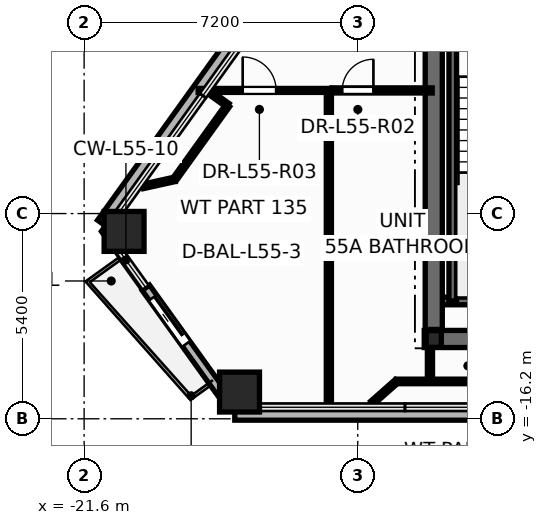
"""IFC4 building model, lengths in metres.
Left out: names, types, materials, properties, quantities, classifications, styles, units other than length and angle.
Written with IfcOpenShell. Run it as: python <this file> out.ifc"""

import sys

from ifc_helpers import new_model, si_unit, direction, frame, frame_2d, origin, origin_2d, place, context, subcontext, project, spatial, rectangle, hollow_rectangle, i_section, extrude, element, fill, save


model = new_model("IFC4")
c1 = context("Model", 3, precision=1e-05, world=origin(), true_north=direction((0.0, 1.0)))
c2 = subcontext(c1, "Body", "Model", "MODEL_VIEW")
j1 = project(units=[si_unit("LENGTHUNIT", "METRE"), si_unit("PLANEANGLEUNIT", "RADIAN")], contexts=[c1])
p1 = place(None, origin())
s1 = spatial("IfcSite", under=j1, at=p1, CompositionType="ELEMENT")
p2 = place(p1, origin())
s2 = spatial("IfcBuilding", under=s1, at=p2, CompositionType="ELEMENT")
p3 = place(p2, frame((0.0, 0.0, 210.9)))
s3 = spatial("IfcBuildingStorey", under=s2, at=p3, CompositionType="ELEMENT", Elevation=210.9)
for number, where, z_axis, x_axis in (
    (1, (-20.548, -11.27, 0.0), (0.0, 0.0, 1.0), (1.0, 0.0, 0.0)),
    (2, (-17.511, -15.497, 0.0), (0.0, 0.0, 1.0), (1.0, 0.0, 0.0)),
):
    element("IfcColumn", number, at=place(p3, frame(where, z_axis=z_axis, x_axis=x_axis)), inside=s3, PredefinedType="COLUMN", context=c2, shape_type="SweptSolid", body=[
        extrude(hollow_rectangle(XDim=1.05, YDim=1.05, WallThickness=0.045, at=origin_2d()), origin(), (0.0, 0.0, 1.0), 3.6),
    ])
p4 = place(p3, frame((-12.4, -14.1, 0.0), z_axis=(0.0, 0.0, 1.0), x_axis=(1.0, 0.0, 0.0)))
e3 = element("IfcColumn", 3, at=p4, inside=s3, PredefinedType="COLUMN", context=c2, shape_type="SweptSolid", body=[
    extrude(i_section(OverallWidth=0.4, OverallDepth=0.44, WebThickness=0.028, FlangeThickness=0.04, at=origin_2d()), origin(), (0.0, 0.0, 1.0), 3.6),
])
p5 = place(p3, frame((-17.636, -16.057, -0.2), z_axis=(0.0, 0.0, 1.0), x_axis=(1.0, 0.0, 0.0)))
e4 = element("IfcWall", 4, at=p5, inside=s3, PredefinedType="PARAPET", context=c2, shape_type="SweptSolid", body=[
    extrude(rectangle(XDim=35.272, YDim=0.36, at=frame_2d((17.636, 0.0))), origin(), (0.0, 0.0, 1.0), 0.38),
])
p6 = place(p3, frame((-12.032, 1.541, -0.2), z_axis=(0.0, 0.0, 1.0), x_axis=(-0.583546701141, -0.812079582053, 0.0)))
e5 = element("IfcWall", 5, at=p6, inside=s3, PredefinedType="PARAPET", context=c2, shape_type="SweptSolid", body=[
    extrude(rectangle(XDim=15.541, YDim=0.36, at=frame_2d((7.77, 0.0))), origin(), (0.0, 0.0, 1.0), 0.38),
])
p7 = place(p3, frame((-19.976, -12.751, -0.015), z_axis=(0.0, 0.0, 1.0), x_axis=(0.5835494265, -0.812077623649, 0.0)))
e6 = element("IfcWall", 6, at=p7, inside=s3, PredefinedType="STANDARD", context=c2, shape_type="SweptSolid", body=[
    extrude(rectangle(XDim=3.833, YDim=0.24, at=frame_2d((1.917, 0.0))), origin(), (0.0, 0.0, 1.0), 2.802),
])
p8 = place(p7, frame((0.32, 0.0, 0.015)))
e7 = element("IfcOpeningElement", 7, at=p8, cuts=e6, PredefinedType="OPENING", context=c2, shape_type="SweptSolid", body=[
    extrude(rectangle(XDim=1.506, YDim=2.204, at=frame_2d((0.75, 1.102))), frame((0.0, 0.13, 0.0), z_axis=(0.0, -1.0, 0.0), x_axis=(1.0, 0.0, 0.0)), (0.0, 0.0, 1.0), 0.26),
])
p9 = place(p3, frame((-12.65, -14.1, 0.0), z_axis=(0.0, 0.0, 1.0), x_axis=(1.0, 0.0, 0.0)))
e8 = element("IfcWall", 8, at=p9, inside=s3, PredefinedType="SHEAR", context=c2, shape_type="SweptSolid", body=[
    extrude(rectangle(XDim=25.3, YDim=0.45, at=frame_2d((12.65, 0.0))), origin(), (0.0, 0.0, 1.0), 3.6),
])
p10 = place(p3, frame((-12.35, -13.1, 0.0), z_axis=(0.0, 0.0, 1.0), x_axis=(1.0, 0.0, 0.0)))
e9 = element("IfcWall", 9, at=p10, inside=s3, PredefinedType="SOLIDWALL", context=c2, shape_type="SweptSolid", body=[
    extrude(rectangle(XDim=3.87, YDim=0.2, at=frame_2d((1.935, 0.0))), origin(), (0.0, 0.0, 1.0), 3.6),
])
p11 = place(p3, frame((-11.9, -13.1, 0.0), z_axis=(0.0, 0.0, 1.0), x_axis=(0.0, 1.0, 0.0)))
e10 = element("IfcWall", 10, at=p11, inside=s3, PredefinedType="SOLIDWALL", context=c2, shape_type="SweptSolid", body=[
    extrude(rectangle(XDim=7.58, YDim=0.2, at=frame_2d((3.79, 0.0))), origin(), (0.0, 0.0, 1.0), 3.6),
])
p12 = place(p3, frame((-12.4, -13.85, 0.0), z_axis=(0.0, 0.0, 1.0), x_axis=(0.0, 1.0, 0.0)))
e11 = element("IfcWall", 11, at=p12, inside=s3, PredefinedType="SHEAR", context=c2, shape_type="SweptSolid", body=[
    extrude(rectangle(XDim=9.4, YDim=0.45, at=frame_2d((4.7, 0.0))), origin(), (0.0, 0.0, 1.0), 3.6),
])
p13 = place(p3, frame((-15.16, -15.897, 0.0), z_axis=(0.0, 0.0, 1.0), x_axis=(0.0, 1.0, 0.0)))
e12 = element("IfcWall", 12, at=p13, inside=s3, PredefinedType="PARTITIONING", context=c2, shape_type="SweptSolid", body=[
    extrude(rectangle(XDim=8.337, YDim=0.135, at=frame_2d((4.168, 0.0))), origin(), (0.0, 0.0, 1.0), 2.787),
])
p14 = place(p3, frame((-13.381, -15.217, 0.0), z_axis=(0.0, 0.0, 1.0), x_axis=(1.0, 0.0, 0.0)))
e13 = element("IfcWall", 13, at=p14, inside=s3, PredefinedType="PARTITIONING", context=c2, shape_type="SweptSolid", body=[
    extrude(rectangle(XDim=3.757, YDim=0.12, at=frame_2d((1.879, 0.0))), origin(), (0.0, 0.0, 1.0), 2.787),
])
p15 = place(p3, frame((-18.6, -7.56, 0.0), z_axis=(0.0, 0.0, 1.0), x_axis=(1.0, 0.0, 0.0)))
e14 = element("IfcWall", 14, at=p15, inside=s3, PredefinedType="PARTITIONING", context=c2, shape_type="SweptSolid", body=[
    extrude(rectangle(XDim=3.52, YDim=0.105, at=frame_2d((1.76, 0.0))), origin(), (0.0, 0.0, 1.0), 2.32),
])
p16 = place(p15, frame((1.172, 0.0, 0.0)))
e15 = element("IfcOpeningElement", 15, at=p16, cuts=e14, PredefinedType="OPENING", context=c2, shape_type="SweptSolid", body=[
    extrude(rectangle(XDim=0.886, YDim=2.104, at=frame_2d((0.44, 1.052))), frame((0.0, 0.062, 0.0), z_axis=(0.0, -1.0, 0.0), x_axis=(1.0, 0.0, 0.0)), (0.0, 0.0, 1.0), 0.125),
])
p17 = place(p3, frame((-15.078, -7.56, 0.0), z_axis=(0.0, 0.0, 1.0), x_axis=(1.0, 0.0, 0.0)))
e16 = element("IfcWall", 16, at=p17, inside=s3, PredefinedType="PARTITIONING", context=c2, shape_type="SweptSolid", body=[
    extrude(rectangle(XDim=2.638, YDim=0.135, at=frame_2d((1.319, 0.0))), origin(), (0.0, 0.0, 1.0), 2.787),
])
p18 = place(p17, frame((0.271, 0.0, 0.0)))
e17 = element("IfcOpeningElement", 17, at=p18, cuts=e16, PredefinedType="OPENING", context=c2, shape_type="SweptSolid", body=[
    extrude(rectangle(XDim=0.826, YDim=2.104, at=frame_2d((0.41, 1.052))), frame((0.0, 0.078, 0.0), z_axis=(0.0, -1.0, 0.0), x_axis=(1.0, 0.0, 0.0)), (0.0, 0.0, 1.0), 0.155),
])
p19 = place(p3, frame((-17.82, -7.953, 0.0), z_axis=(0.0, 0.0, 1.0), x_axis=(-0.583516561227, -0.812101239239, 0.0)))
e18 = element("IfcWall", 18, at=p19, inside=s3, PredefinedType="PARTITIONING", context=c2, shape_type="SweptSolid", body=[
    extrude(rectangle(XDim=2.4, YDim=0.12, at=frame_2d((1.2, 0.0))), origin(), (0.0, 0.0, 1.0), 2.32),
])
p20 = place(p3, frame((-14.019, -15.78, 0.0), z_axis=(0.0, 0.0, 1.0), x_axis=(0.749620225682, 0.661868202324, 0.0)))
e19 = element("IfcWall", 19, at=p20, inside=s3, PredefinedType="PARTITIONING", context=c2, shape_type="SweptSolid", body=[
    extrude(rectangle(XDim=0.851, YDim=0.12, at=frame_2d((0.426, 0.0))), origin(), (0.0, 0.0, 1.0), 2.787),
])
p21 = place(p3, frame((-19.22, -9.902, 0.0), z_axis=(0.0, 0.0, 1.0), x_axis=(-0.976395829015, -0.215988854068, 0.0)))
e20 = element("IfcWall", 20, at=p21, inside=s3, PredefinedType="PARTITIONING", context=c2, shape_type="SweptSolid", body=[
    extrude(rectangle(XDim=0.851, YDim=0.12, at=frame_2d((0.426, 0.0))), origin(), (0.0, 0.0, 1.0), 2.32),
])
p22 = place(p3, frame((-18.364, -7.562, 0.0), z_axis=(0.0, 0.0, 1.0), x_axis=(0.811907418628, -0.583786213932, 0.0)))
e21 = element("IfcWall", 21, at=p22, inside=s3, PredefinedType="PARTITIONING", context=c2, shape_type="SweptSolid", body=[
    extrude(rectangle(XDim=0.67, YDim=0.12, at=frame_2d((0.335, 0.0))), origin(), (0.0, 0.0, 1.0), 2.787),
])
p23 = place(p3, frame((-12.5, -14.4, 0.0), z_axis=(0.0, 0.0, 1.0), x_axis=(0.0, -1.0, 0.0)))
e22 = element("IfcWall", 22, at=p23, inside=s3, PredefinedType="PARTITIONING", context=c2, shape_type="SweptSolid", body=[
    extrude(rectangle(XDim=0.637, YDim=0.135, at=frame_2d((0.318, 0.0))), origin(), (0.0, 0.0, 1.0), 3.345),
])
p24 = place(p8, origin())
e23 = element("IfcDoor", 23, at=p24, inside=s3, OperationType="SLIDING_TO_RIGHT", PredefinedType="DOOR", context=c2, shape_type="SweptSolid", body=[
    extrude(rectangle(XDim=1.5, YDim=2.2, at=frame_2d((0.75, 1.1))), frame((0.0, 0.025, 0.0), z_axis=(0.0, -1.0, 0.0), x_axis=(1.0, 0.0, 0.0)), (0.0, 0.0, 1.0), 0.05),
])
fill(e7, e23)
p25 = place(p18, origin())
e24 = element("IfcDoor", 24, at=p25, inside=s3, OperationType="SINGLE_SWING_RIGHT", PredefinedType="DOOR", context=c2, shape_type="SweptSolid", body=[
    extrude(rectangle(XDim=0.82, YDim=2.1, at=frame_2d((0.41, 1.05))), frame((0.0, 0.025, 0.0), z_axis=(0.0, -1.0, 0.0), x_axis=(1.0, 0.0, 0.0)), (0.0, 0.0, 1.0), 0.05),
])
fill(e17, e24)
p26 = place(p16, origin())
e25 = element("IfcDoor", 25, at=p26, inside=s3, OperationType="SINGLE_SWING_LEFT", PredefinedType="DOOR", context=c2, shape_type="SweptSolid", body=[
    extrude(rectangle(XDim=0.88, YDim=2.1, at=frame_2d((0.44, 1.05))), frame((0.0, 0.025, 0.0), z_axis=(0.0, -1.0, 0.0), x_axis=(1.0, 0.0, 0.0)), (0.0, 0.0, 1.0), 0.05),
])
fill(e15, e25)
save(model, sys.argv[1])
